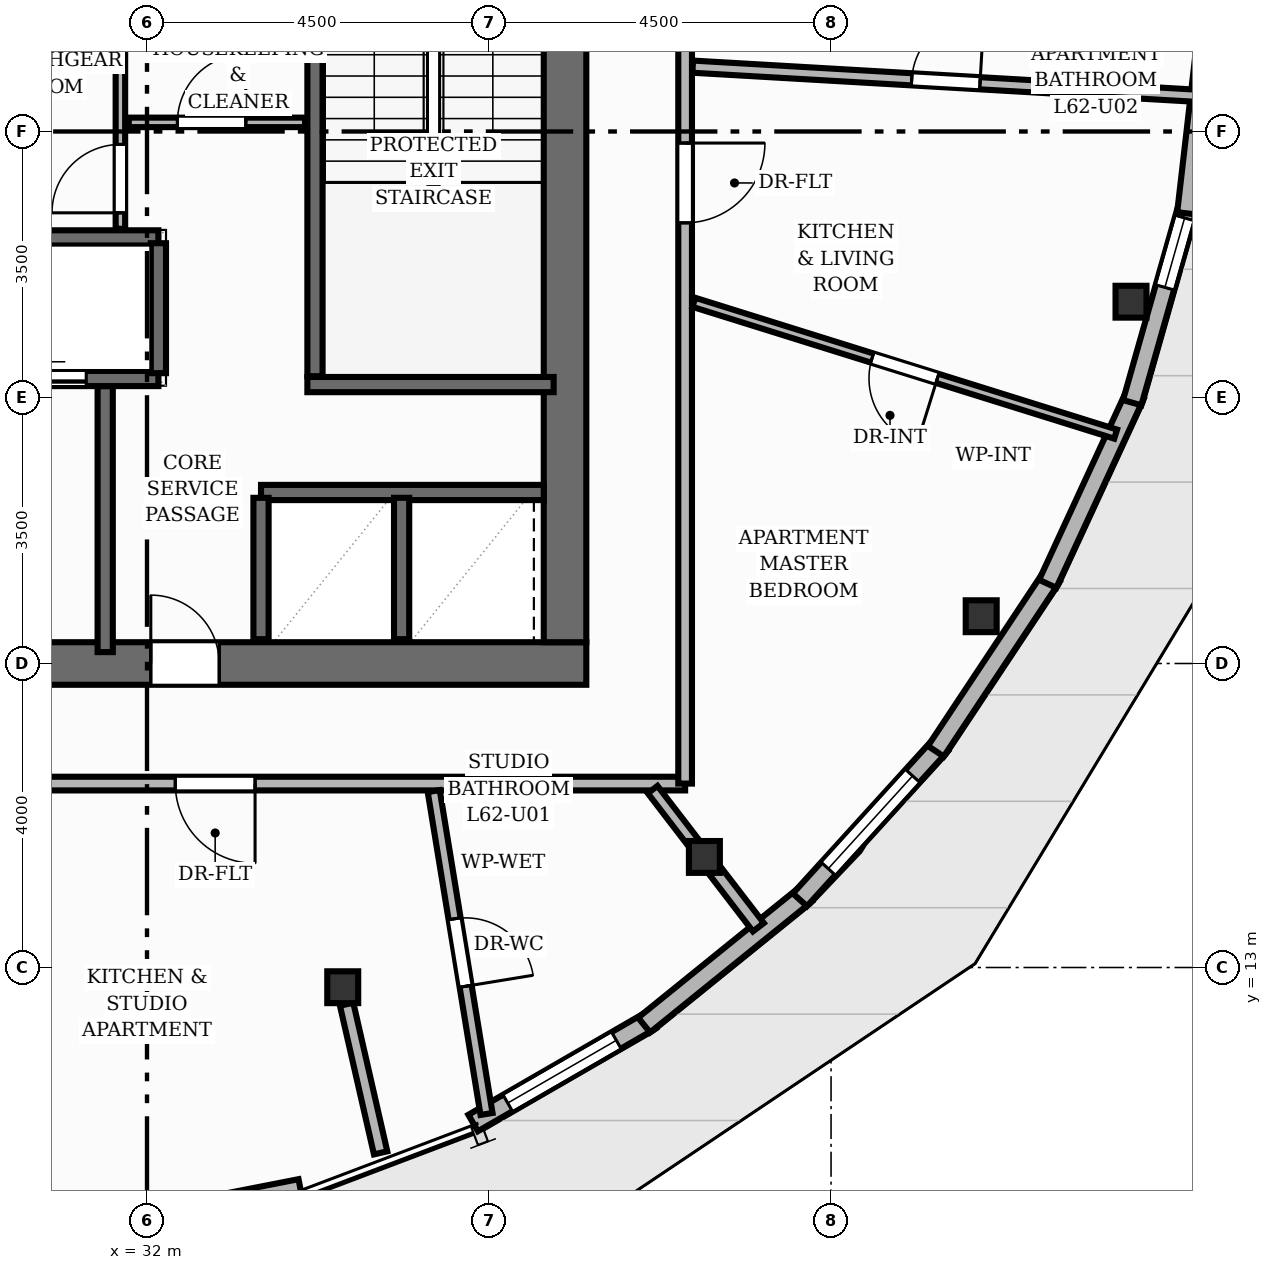
"""IFC4 building model, lengths in metres.
Left out: names, types, materials, properties, quantities, classifications, styles, units other than length and angle.
Written with IfcOpenShell. Run it as: python <this file> out.ifc"""

import sys

from ifc_helpers import new_model, si_unit, direction, frame, frame_2d, origin, origin_2d, place, context, subcontext, project, spatial, rectangle, i_section, extrude, element, fill, save


model = new_model("IFC4")
c1 = context("Model", 3, precision=1e-05, world=origin(), true_north=direction((0.0, 1.0)))
c2 = subcontext(c1, "Body", "Model", "MODEL_VIEW")
j1 = project(units=[si_unit("LENGTHUNIT", "METRE"), si_unit("PLANEANGLEUNIT", "RADIAN")], contexts=[c1])
p1 = place(None, origin())
s1 = spatial("IfcSite", under=j1, at=p1, CompositionType="ELEMENT")
p2 = place(p1, origin())
s2 = spatial("IfcBuilding", under=s1, at=p2, CompositionType="ELEMENT")
p3 = place(p2, frame((0.0, 0.0, 207.84)))
s3 = spatial("IfcBuildingStorey", under=s2, at=p3, CompositionType="ELEMENT", Elevation=207.84)
p4 = place(p3, frame((26.22, 17.0, 0.0), z_axis=(0.0, 0.0, 1.0), x_axis=(1.0, 0.0, 0.0)))
e1 = element("IfcWall", 1, at=p4, inside=s3, PredefinedType="SHEAR", context=c2, shape_type="SweptSolid", body=[
    extrude(rectangle(XDim=11.56, YDim=0.56, at=frame_2d((5.78, 0.0))), origin(), (0.0, 0.0, 1.0), 3.2),
])
p5 = place(p4, frame((2.28, 0.0, 0.0)))
e2 = element("IfcOpeningElement", 2, at=p5, cuts=e1, PredefinedType="OPENING", context=c2, shape_type="SweptSolid", body=[
    extrude(rectangle(XDim=1.1, YDim=2.15, at=frame_2d((0.55, 1.075))), frame((0.0, 0.29, 0.0), z_axis=(0.0, -1.0, 0.0), x_axis=(1.0, 0.0, 0.0)), (0.0, 0.0, 1.0), 0.58),
])
p6 = place(p4, frame((5.83, 0.0, 0.0)))
e3 = element("IfcOpeningElement", 3, at=p6, cuts=e1, PredefinedType="OPENING", context=c2, shape_type="SweptSolid", body=[
    extrude(rectangle(XDim=0.9, YDim=2.1, at=frame_2d((0.45, 1.05))), frame((0.0, 0.29, 0.0), z_axis=(0.0, -1.0, 0.0), x_axis=(1.0, 0.0, 0.0)), (0.0, 0.0, 1.0), 0.58),
])
p7 = place(p3, frame((37.5, 17.28, 0.0), z_axis=(0.0, 0.0, 1.0), x_axis=(0.0, 1.0, 0.0)))
e4 = element("IfcWall", 4, at=p7, inside=s3, PredefinedType="SHEAR", context=c2, shape_type="SweptSolid", body=[
    extrude(rectangle(XDim=13.44, YDim=0.56, at=frame_2d((6.72, 0.0))), origin(), (0.0, 0.0, 1.0), 3.2),
])
for number, where, z_axis, x_axis in (
    (5, (34.575, 12.74, 0.0), (0.0, 0.0, 1.0), (1.0, 0.0, 0.0)),
    (6, (39.333, 14.455, 0.0), (0.0, 0.0, 1.0), (1.0, 0.0, 0.0)),
    (7, (42.975, 17.622, 0.0), (0.0, 0.0, 1.0), (1.0, 0.0, 0.0)),
    (8, (44.946, 21.76, 0.0), (0.0, 0.0, 1.0), (1.0, 0.0, 0.0)),
):
    element("IfcColumn", number, at=place(p3, frame(where, z_axis=z_axis, x_axis=x_axis)), inside=s3, PredefinedType="COLUMN", context=c2, shape_type="SweptSolid", body=[
        extrude(i_section(OverallWidth=0.407, OverallDepth=0.419, WebThickness=0.031, FlangeThickness=0.049, at=origin_2d()), origin(), (0.0, 0.0, 1.0), 3.2),
    ])
p8 = place(p3, frame((34.018, 10.092, 0.0), z_axis=(0.0, 0.0, 1.0), x_axis=(-0.981387252987, -0.1920392139, 0.0)))
e9 = element("IfcWall", 9, at=p8, inside=s3, PredefinedType="SOLIDWALL", context=c2, shape_type="SweptSolid", body=[
    extrude(rectangle(XDim=2.592, YDim=0.25, at=frame_2d((1.296, 0.0))), origin(), (0.0, 0.0, 1.0), 2.96),
])
p9 = place(p8, frame((0.721, 0.0, 0.0)))
e10 = element("IfcOpeningElement", 10, at=p9, cuts=e9, PredefinedType="OPENING", context=c2, shape_type="SweptSolid", body=[
    extrude(rectangle(XDim=1.15, YDim=2.2, at=frame_2d((0.575, 1.1))), frame((0.0, 0.135, 0.0), z_axis=(0.0, -1.0, 0.0), x_axis=(1.0, 0.0, 0.0)), (0.0, 0.0, 1.0), 0.27),
])
p10 = place(p3, frame((38.63, 12.305, 0.0), z_axis=(0.0, 0.0, 1.0), x_axis=(-0.865914653104, -0.500191776762, 0.0)))
e11 = element("IfcWall", 11, at=p10, inside=s3, PredefinedType="SOLIDWALL", context=c2, shape_type="SweptSolid", body=[
    extrude(rectangle(XDim=2.702, YDim=0.25, at=frame_2d((1.351, 0.0))), origin(), (0.0, 0.0, 1.0), 2.96),
])
p11 = place(p10, frame((0.526, 0.0, 0.85)))
e12 = element("IfcOpeningElement", 12, at=p11, cuts=e11, PredefinedType="OPENING", context=c2, shape_type="SweptSolid", body=[
    extrude(rectangle(XDim=1.65, YDim=1.55, at=frame_2d((0.825, 0.775))), frame((0.0, 0.135, 0.0), z_axis=(0.0, -1.0, 0.0), x_axis=(1.0, 0.0, 0.0)), (0.0, 0.0, 1.0), 0.27),
])
p12 = place(p3, frame((40.67, 13.965, 0.0), z_axis=(0.0, 0.0, 1.0), x_axis=(-0.777535429671, -0.628839133329, 0.0)))
e13 = element("IfcWall", 13, at=p12, inside=s3, PredefinedType="SOLIDWALL", context=c2, shape_type="SweptSolid", body=[
    extrude(rectangle(XDim=2.739, YDim=0.25, at=frame_2d((1.369, 0.0))), origin(), (0.0, 0.0, 1.0), 2.96),
])
p13 = place(p3, frame((42.446, 15.931, 0.0), z_axis=(0.0, 0.0, 1.0), x_axis=(-0.672668387979, -0.739944078842, 0.0)))
e14 = element("IfcWall", 14, at=p13, inside=s3, PredefinedType="SOLIDWALL", context=c2, shape_type="SweptSolid", body=[
    extrude(rectangle(XDim=2.758, YDim=0.25, at=frame_2d((1.379, 0.0))), origin(), (0.0, 0.0, 1.0), 2.96),
])
p14 = place(p13, frame((0.554, 0.0, 0.85)))
e15 = element("IfcOpeningElement", 15, at=p14, cuts=e14, PredefinedType="OPENING", context=c2, shape_type="SweptSolid", body=[
    extrude(rectangle(XDim=1.65, YDim=1.55, at=frame_2d((0.825, 0.775))), frame((0.0, 0.135, 0.0), z_axis=(0.0, -1.0, 0.0), x_axis=(1.0, 0.0, 0.0)), (0.0, 0.0, 1.0), 0.27),
])
p15 = place(p3, frame((43.904, 18.144, 0.0), z_axis=(0.0, 0.0, 1.0), x_axis=(-0.553003487622, -0.83317893797, 0.0)))
e16 = element("IfcWall", 16, at=p15, inside=s3, PredefinedType="SOLIDWALL", context=c2, shape_type="SweptSolid", body=[
    extrude(rectangle(XDim=2.758, YDim=0.25, at=frame_2d((1.379, 0.0))), origin(), (0.0, 0.0, 1.0), 2.96),
])
p16 = place(p3, frame((45.0, 20.534, 0.0), z_axis=(0.0, 0.0, 1.0), x_axis=(-0.419544316157, -0.907734854889, 0.0)))
e17 = element("IfcWall", 17, at=p16, inside=s3, PredefinedType="SOLIDWALL", context=c2, shape_type="SweptSolid", body=[
    extrude(rectangle(XDim=2.739, YDim=0.25, at=frame_2d((1.369, 0.0))), origin(), (0.0, 0.0, 1.0), 2.96),
])
p17 = place(p3, frame((45.699, 23.031, 0.0), z_axis=(0.0, 0.0, 1.0), x_axis=(-0.273097490466, -0.961986362014, 0.0)))
e18 = element("IfcWall", 18, at=p17, inside=s3, PredefinedType="SOLIDWALL", context=c2, shape_type="SweptSolid", body=[
    extrude(rectangle(XDim=2.702, YDim=0.25, at=frame_2d((1.351, 0.0))), origin(), (0.0, 0.0, 1.0), 2.577),
])
p18 = place(p17, frame((0.175, 0.0, 0.85)))
e19 = element("IfcOpeningElement", 19, at=p18, cuts=e18, PredefinedType="OPENING", context=c2, shape_type="SweptSolid", body=[
    extrude(rectangle(XDim=0.95, YDim=1.45, at=frame_2d((0.475, 0.725))), frame((0.0, 0.135, 0.0), z_axis=(0.0, -1.0, 0.0), x_axis=(1.0, 0.0, 0.0)), (0.0, 0.0, 1.0), 0.27),
])
p19 = place(p3, frame((45.982, 25.557, 0.0), z_axis=(0.0, 0.0, 1.0), x_axis=(-0.114746448117, -0.993394812068, 0.0)))
e20 = element("IfcWall", 20, at=p19, inside=s3, PredefinedType="SOLIDWALL", context=c2, shape_type="SweptSolid", body=[
    extrude(rectangle(XDim=2.651, YDim=0.25, at=frame_2d((1.326, 0.0))), origin(), (0.0, 0.0, 1.0), 2.96),
])
p20 = place(p3, frame((34.21, 20.78, 0.0), z_axis=(0.0, 0.0, 1.0), x_axis=(0.0, 1.0, 0.0)))
e21 = element("IfcWall", 21, at=p20, inside=s3, PredefinedType="SHEAR", context=c2, shape_type="SweptSolid", body=[
    extrude(rectangle(XDim=6.44, YDim=0.2, at=frame_2d((3.22, 0.0))), origin(), (0.0, 0.0, 1.0), 3.2),
])
p21 = place(p3, frame((34.11, 20.67, 0.0), z_axis=(0.0, 0.0, 1.0), x_axis=(1.0, 0.0, 0.0)))
e22 = element("IfcWall", 22, at=p21, inside=s3, PredefinedType="SHEAR", context=c2, shape_type="SweptSolid", body=[
    extrude(rectangle(XDim=3.24, YDim=0.2, at=frame_2d((1.62, 0.0))), origin(), (0.0, 0.0, 1.0), 3.2),
])
p22 = place(p3, frame((31.45, 17.15, 0.0), z_axis=(0.0, 0.0, 1.0), x_axis=(0.0, 1.0, 0.0)))
e23 = element("IfcWall", 23, at=p22, inside=s3, PredefinedType="SHEAR", context=c2, shape_type="SweptSolid", body=[
    extrude(rectangle(XDim=3.5, YDim=0.2, at=frame_2d((1.75, 0.0))), origin(), (0.0, 0.0, 1.0), 3.2),
])
p23 = place(p3, frame((29.85, 20.75, 0.0), z_axis=(0.0, 0.0, 1.0), x_axis=(1.0, 0.0, 0.0)))
e24 = element("IfcWall", 24, at=p23, inside=s3, PredefinedType="SHEAR", context=c2, shape_type="SweptSolid", body=[
    extrude(rectangle(XDim=2.3, YDim=0.2, at=frame_2d((1.15, 0.0))), origin(), (0.0, 0.0, 1.0), 3.2),
])
p24 = place(p23, frame((0.25, 0.0, 0.0)))
e25 = element("IfcOpeningElement", 25, at=p24, cuts=e24, PredefinedType="OPENING", context=c2, shape_type="SweptSolid", body=[
    extrude(rectangle(XDim=1.1, YDim=2.15, at=frame_2d((0.55, 1.075))), frame((0.0, 0.11, 0.0), z_axis=(0.0, -1.0, 0.0), x_axis=(1.0, 0.0, 0.0)), (0.0, 0.0, 1.0), 0.22),
])
p25 = place(p3, frame((29.85, 22.6, 0.0), z_axis=(0.0, 0.0, 1.0), x_axis=(1.0, 0.0, 0.0)))
e26 = element("IfcWall", 26, at=p25, inside=s3, PredefinedType="SHEAR", context=c2, shape_type="SweptSolid", body=[
    extrude(rectangle(XDim=2.3, YDim=0.2, at=frame_2d((1.15, 0.0))), origin(), (0.0, 0.0, 1.0), 3.2),
])
p26 = place(p3, frame((32.15, 20.82, 0.0), z_axis=(0.0, 0.0, 1.0), x_axis=(0.0, 1.0, 0.0)))
e27 = element("IfcWall", 27, at=p26, inside=s3, PredefinedType="SHEAR", context=c2, shape_type="SweptSolid", body=[
    extrude(rectangle(XDim=1.71, YDim=0.2, at=frame_2d((0.855, 0.0))), origin(), (0.0, 0.0, 1.0), 3.2),
])
p27 = place(p3, frame((33.5, 19.25, 0.0), z_axis=(0.0, 0.0, 1.0), x_axis=(1.0, 0.0, 0.0)))
e28 = element("IfcWall", 28, at=p27, inside=s3, PredefinedType="SHEAR", context=c2, shape_type="SweptSolid", body=[
    extrude(rectangle(XDim=3.72, YDim=0.2, at=frame_2d((1.86, 0.0))), origin(), (0.0, 0.0, 1.0), 3.2),
])
for number, where, z_axis, x_axis in (
    (29, (33.5, 17.32, 0.0), (0.0, 0.0, 1.0), (0.0, 1.0, 0.0)),
    (30, (35.35, 17.32, 0.0), (0.0, 0.0, 1.0), (0.0, 1.0, 0.0)),
):
    element("IfcWall", number, at=place(p3, frame(where, z_axis=z_axis, x_axis=x_axis)), inside=s3, PredefinedType="SHEAR", context=c2, shape_type="SweptSolid", body=[
        extrude(rectangle(XDim=1.86, YDim=0.2, at=frame_2d((0.93, 0.0))), origin(), (0.0, 0.0, 1.0), 3.2),
    ])
p28 = place(p3, frame((31.65, 22.72, 0.0), z_axis=(0.0, 0.0, 1.0), x_axis=(0.0, 1.0, 0.0)))
e31 = element("IfcWall", 31, at=p28, inside=s3, PredefinedType="PARTITIONING", context=c2, shape_type="SweptSolid", body=[
    extrude(rectangle(XDim=2.52, YDim=0.125, at=frame_2d((1.26, 0.0))), origin(), (0.0, 0.0, 1.0), 2.955),
])
p29 = place(p28, frame((0.21, 0.0, 0.0)))
e32 = element("IfcOpeningElement", 32, at=p29, cuts=e31, PredefinedType="OPENING", context=c2, shape_type="SweptSolid", body=[
    extrude(rectangle(XDim=0.9, YDim=2.1, at=frame_2d((0.45, 1.05))), frame((0.0, 0.073, 0.0), z_axis=(0.0, -1.0, 0.0), x_axis=(1.0, 0.0, 0.0)), (0.0, 0.0, 1.0), 0.145),
])
p30 = place(p3, frame((31.76, 24.12, 0.0), z_axis=(0.0, 0.0, 1.0), x_axis=(1.0, 0.0, 0.0)))
e33 = element("IfcWall", 33, at=p30, inside=s3, PredefinedType="PARTITIONING", context=c2, shape_type="SweptSolid", body=[
    extrude(rectangle(XDim=2.32, YDim=0.125, at=frame_2d((1.16, 0.0))), origin(), (0.0, 0.0, 1.0), 2.955),
])
p31 = place(p30, frame((0.64, 0.0, 0.0)))
e34 = element("IfcOpeningElement", 34, at=p31, cuts=e33, PredefinedType="OPENING", context=c2, shape_type="SweptSolid", body=[
    extrude(rectangle(XDim=0.9, YDim=2.1, at=frame_2d((0.45, 1.05))), frame((0.0, 0.073, 0.0), z_axis=(0.0, -1.0, 0.0), x_axis=(1.0, 0.0, 0.0)), (0.0, 0.0, 1.0), 0.145),
])
p32 = place(p3, frame((34.626, 12.517, 0.0), z_axis=(0.0, 0.0, 1.0), x_axis=(0.222930532859, -0.974834333371, 0.0)))
e35 = element("IfcWall", 35, at=p32, inside=s3, PredefinedType="PARTITIONING", context=c2, shape_type="SweptSolid", body=[
    extrude(rectangle(XDim=2.006, YDim=0.18, at=frame_2d((1.003, 0.0))), origin(), (0.0, 0.0, 1.0), 2.403),
])
p33 = place(p3, frame((39.473, 14.273, 0.0), z_axis=(0.0, 0.0, 1.0), x_axis=(0.609219316709, -0.793001780672, 0.0)))
e36 = element("IfcWall", 36, at=p33, inside=s3, PredefinedType="PARTITIONING", context=c2, shape_type="SweptSolid", body=[
    extrude(rectangle(XDim=0.937, YDim=0.18, at=frame_2d((0.468, 0.0))), origin(), (0.0, 0.0, 1.0), 2.403),
])
p34 = place(p3, frame((39.08, 15.42, 0.0), z_axis=(0.0, 0.0, 1.0), x_axis=(-1.0, 0.0, 0.0)))
e37 = element("IfcWall", 37, at=p34, inside=s3, PredefinedType="PARTITIONING", context=c2, shape_type="SweptSolid", body=[
    extrude(rectangle(XDim=14.16, YDim=0.18, at=frame_2d((7.08, 0.0))), origin(), (0.0, 0.0, 1.0), 2.955),
])
p35 = place(p34, frame((5.658, 0.0, 0.0)))
e38 = element("IfcOpeningElement", 38, at=p35, cuts=e37, PredefinedType="OPENING", context=c2, shape_type="SweptSolid", body=[
    extrude(rectangle(XDim=1.05, YDim=2.15, at=frame_2d((0.525, 1.075))), frame((0.0, 0.1, 0.0), z_axis=(0.0, -1.0, 0.0), x_axis=(1.0, 0.0, 0.0)), (0.0, 0.0, 1.0), 0.2),
])
p36 = place(p34, frame((11.626, 0.0, 0.0)))
e39 = element("IfcOpeningElement", 39, at=p36, cuts=e37, PredefinedType="OPENING", context=c2, shape_type="SweptSolid", body=[
    extrude(rectangle(XDim=1.05, YDim=2.15, at=frame_2d((0.525, 1.075))), frame((0.0, 0.1, 0.0), z_axis=(0.0, -1.0, 0.0), x_axis=(1.0, 0.0, 0.0)), (0.0, 0.0, 1.0), 0.2),
])
p37 = place(p3, frame((39.08, 28.808, 0.0), z_axis=(0.0, 0.0, 1.0), x_axis=(0.0, -1.0, 0.0)))
e40 = element("IfcWall", 40, at=p37, inside=s3, PredefinedType="PARTITIONING", context=c2, shape_type="SweptSolid", body=[
    extrude(rectangle(XDim=13.388, YDim=0.18, at=frame_2d((6.694, 0.0))), origin(), (0.0, 0.0, 1.0), 2.955),
])
p38 = place(p37, frame((4.96, 0.0, 0.0)))
e41 = element("IfcOpeningElement", 41, at=p38, cuts=e40, PredefinedType="OPENING", context=c2, shape_type="SweptSolid", body=[
    extrude(rectangle(XDim=1.05, YDim=2.15, at=frame_2d((0.525, 1.075))), frame((0.0, 0.1, 0.0), z_axis=(0.0, -1.0, 0.0), x_axis=(1.0, 0.0, 0.0)), (0.0, 0.0, 1.0), 0.2),
])
p39 = place(p37, frame((1.352, 0.0, 0.0)))
e42 = element("IfcOpeningElement", 42, at=p39, cuts=e40, PredefinedType="OPENING", context=c2, shape_type="SweptSolid", body=[
    extrude(rectangle(XDim=0.9, YDim=2.1, at=frame_2d((0.45, 1.05))), frame((0.0, 0.1, 0.0), z_axis=(0.0, -1.0, 0.0), x_axis=(1.0, 0.0, 0.0)), (0.0, 0.0, 1.0), 0.2),
])
p40 = place(p3, frame((35.772, 15.321, 0.0), z_axis=(0.0, 0.0, 1.0), x_axis=(0.16134496112, -0.986898071495, 0.0)))
e43 = element("IfcWall", 43, at=p40, inside=s3, PredefinedType="PLUMBINGWALL", context=c2, shape_type="SweptSolid", body=[
    extrude(rectangle(XDim=4.305, YDim=0.16, at=frame_2d((2.152, 0.0))), origin(), (0.0, 0.0, 1.0), 2.692),
])
p41 = place(p40, frame((1.702, 0.0, 0.0)))
e44 = element("IfcOpeningElement", 44, at=p41, cuts=e43, PredefinedType="OPENING", context=c2, shape_type="SweptSolid", body=[
    extrude(rectangle(XDim=0.9, YDim=2.1, at=frame_2d((0.45, 1.05))), frame((0.0, 0.09, 0.0), z_axis=(0.0, -1.0, 0.0), x_axis=(1.0, 0.0, 0.0)), (0.0, 0.0, 1.0), 0.18),
])
p42 = place(p3, frame((38.653, 15.341, 0.0), z_axis=(0.0, 0.0, 1.0), x_axis=(0.609152657902, -0.793052986484, 0.0)))
e45 = element("IfcWall", 45, at=p42, inside=s3, PredefinedType="PLUMBINGWALL", context=c2, shape_type="SweptSolid", body=[
    extrude(rectangle(XDim=0.888, YDim=0.16, at=frame_2d((0.444, 0.0))), origin(), (0.0, 0.0, 1.0), 2.403),
])
p43 = place(p3, frame((39.18, 24.853, 0.0), z_axis=(0.0, 0.0, 1.0), x_axis=(0.998334151316, -0.057696813744, 0.0)))
e46 = element("IfcWall", 46, at=p43, inside=s3, PredefinedType="PLUMBINGWALL", context=c2, shape_type="SweptSolid", body=[
    extrude(rectangle(XDim=6.673, YDim=0.16, at=frame_2d((3.336, 0.0))), origin(), (0.0, 0.0, 1.0), 2.692),
])
p44 = place(p43, frame((2.886, 0.0, 0.0)))
e47 = element("IfcOpeningElement", 47, at=p44, cuts=e46, PredefinedType="OPENING", context=c2, shape_type="SweptSolid", body=[
    extrude(rectangle(XDim=0.9, YDim=2.1, at=frame_2d((0.45, 1.05))), frame((0.0, 0.09, 0.0), z_axis=(0.0, -1.0, 0.0), x_axis=(1.0, 0.0, 0.0)), (0.0, 0.0, 1.0), 0.18),
])
p45 = place(p3, frame((44.744, 20.018, 0.0), z_axis=(0.0, 0.0, 1.0), x_axis=(-0.954500895626, 0.298208048598, 0.0)))
e48 = element("IfcWall", 48, at=p45, inside=s3, PredefinedType="PARTITIONING", context=c2, shape_type="SweptSolid", body=[
    extrude(rectangle(XDim=5.814, YDim=0.125, at=frame_2d((2.907, 0.0))), origin(), (0.0, 0.0, 1.0), 2.692),
])
p46 = place(p45, frame((2.457, 0.0, 0.0)))
e49 = element("IfcOpeningElement", 49, at=p46, cuts=e48, PredefinedType="OPENING", context=c2, shape_type="SweptSolid", body=[
    extrude(rectangle(XDim=0.9, YDim=2.1, at=frame_2d((0.45, 1.05))), frame((0.0, 0.073, 0.0), z_axis=(0.0, -1.0, 0.0), x_axis=(1.0, 0.0, 0.0)), (0.0, 0.0, 1.0), 0.145),
])
p47 = place(p11, origin())
e50 = element("IfcWindow", 50, at=p47, inside=s3, PartitioningType="SINGLE_PANEL", PredefinedType="WINDOW", context=c2, shape_type="SweptSolid", body=[
    extrude(rectangle(XDim=1.65, YDim=1.55, at=frame_2d((0.825, 0.775))), frame((0.0, 0.03, 0.0), z_axis=(0.0, -1.0, 0.0), x_axis=(1.0, 0.0, 0.0)), (0.0, 0.0, 1.0), 0.06),
])
fill(e12, e50)
p48 = place(p14, origin())
e51 = element("IfcWindow", 51, at=p48, inside=s3, PartitioningType="SINGLE_PANEL", PredefinedType="WINDOW", context=c2, shape_type="SweptSolid", body=[
    extrude(rectangle(XDim=1.65, YDim=1.55, at=frame_2d((0.825, 0.775))), frame((0.0, 0.03, 0.0), z_axis=(0.0, -1.0, 0.0), x_axis=(1.0, 0.0, 0.0)), (0.0, 0.0, 1.0), 0.06),
])
fill(e15, e51)
p49 = place(p18, origin())
e52 = element("IfcWindow", 52, at=p49, inside=s3, PartitioningType="SINGLE_PANEL", PredefinedType="WINDOW", context=c2, shape_type="SweptSolid", body=[
    extrude(rectangle(XDim=0.95, YDim=1.45, at=frame_2d((0.475, 0.725))), frame((0.0, 0.03, 0.0), z_axis=(0.0, -1.0, 0.0), x_axis=(1.0, 0.0, 0.0)), (0.0, 0.0, 1.0), 0.06),
])
fill(e19, e52)
p50 = place(p24, origin())
e53 = element("IfcDoor", 53, at=p50, inside=s3, OperationType="DOUBLE_DOOR_SLIDING", PredefinedType="DOOR", context=c2, shape_type="SweptSolid", body=[
    extrude(rectangle(XDim=1.1, YDim=2.15, at=frame_2d((0.55, 1.075))), frame((0.0, 0.025, 0.0), z_axis=(0.0, -1.0, 0.0), x_axis=(1.0, 0.0, 0.0)), (0.0, 0.0, 1.0), 0.05),
])
fill(e25, e53)
p51 = place(p6, origin())
e54 = element("IfcDoor", 54, at=p51, inside=s3, OperationType="SINGLE_SWING_LEFT", PredefinedType="DOOR", context=c2, shape_type="SweptSolid", body=[
    extrude(rectangle(XDim=0.9, YDim=2.1, at=frame_2d((0.45, 1.05))), frame((0.0, 0.025, 0.0), z_axis=(0.0, -1.0, 0.0), x_axis=(1.0, 0.0, 0.0)), (0.0, 0.0, 1.0), 0.05),
])
fill(e3, e54)
p52 = place(p29, origin())
e55 = element("IfcDoor", 55, at=p52, inside=s3, OperationType="SINGLE_SWING_LEFT", PredefinedType="DOOR", context=c2, shape_type="SweptSolid", body=[
    extrude(rectangle(XDim=0.9, YDim=2.1, at=frame_2d((0.45, 1.05))), frame((0.0, 0.025, 0.0), z_axis=(0.0, -1.0, 0.0), x_axis=(1.0, 0.0, 0.0)), (0.0, 0.0, 1.0), 0.05),
])
fill(e32, e55)
p53 = place(p31, origin())
e56 = element("IfcDoor", 56, at=p53, inside=s3, OperationType="SINGLE_SWING_RIGHT", PredefinedType="DOOR", context=c2, shape_type="SweptSolid", body=[
    extrude(rectangle(XDim=0.9, YDim=2.1, at=frame_2d((0.45, 1.05))), frame((0.0, 0.025, 0.0), z_axis=(0.0, -1.0, 0.0), x_axis=(1.0, 0.0, 0.0)), (0.0, 0.0, 1.0), 0.05),
])
fill(e34, e56)
p54 = place(p35, origin())
e57 = element("IfcDoor", 57, at=p54, inside=s3, OperationType="SINGLE_SWING_LEFT", PredefinedType="DOOR", context=c2, shape_type="SweptSolid", body=[
    extrude(rectangle(XDim=1.05, YDim=2.15, at=frame_2d((0.525, 1.075))), frame((0.0, 0.025, 0.0), z_axis=(0.0, -1.0, 0.0), x_axis=(1.0, 0.0, 0.0)), (0.0, 0.0, 1.0), 0.05),
])
fill(e38, e57)
p55 = place(p41, origin())
e58 = element("IfcDoor", 58, at=p55, inside=s3, OperationType="SINGLE_SWING_RIGHT", PredefinedType="DOOR", context=c2, shape_type="SweptSolid", body=[
    extrude(rectangle(XDim=0.9, YDim=2.1, at=frame_2d((0.45, 1.05))), frame((0.0, 0.025, 0.0), z_axis=(0.0, -1.0, 0.0), x_axis=(1.0, 0.0, 0.0)), (0.0, 0.0, 1.0), 0.05),
])
fill(e44, e58)
p56 = place(p38, origin())
e59 = element("IfcDoor", 59, at=p56, inside=s3, OperationType="SINGLE_SWING_LEFT", PredefinedType="DOOR", context=c2, shape_type="SweptSolid", body=[
    extrude(rectangle(XDim=1.05, YDim=2.15, at=frame_2d((0.525, 1.075))), frame((0.0, 0.025, 0.0), z_axis=(0.0, -1.0, 0.0), x_axis=(1.0, 0.0, 0.0)), (0.0, 0.0, 1.0), 0.05),
])
fill(e41, e59)
p57 = place(p44, origin())
e60 = element("IfcDoor", 60, at=p57, inside=s3, OperationType="SINGLE_SWING_RIGHT", PredefinedType="DOOR", context=c2, shape_type="SweptSolid", body=[
    extrude(rectangle(XDim=0.9, YDim=2.1, at=frame_2d((0.45, 1.05))), frame((0.0, 0.025, 0.0), z_axis=(0.0, -1.0, 0.0), x_axis=(1.0, 0.0, 0.0)), (0.0, 0.0, 1.0), 0.05),
])
fill(e47, e60)
p58 = place(p46, origin())
e61 = element("IfcDoor", 61, at=p58, inside=s3, OperationType="SINGLE_SWING_LEFT", PredefinedType="DOOR", context=c2, shape_type="SweptSolid", body=[
    extrude(rectangle(XDim=0.9, YDim=2.1, at=frame_2d((0.45, 1.05))), frame((0.0, 0.025, 0.0), z_axis=(0.0, -1.0, 0.0), x_axis=(1.0, 0.0, 0.0)), (0.0, 0.0, 1.0), 0.05),
])
fill(e49, e61)
save(model, sys.argv[1])
